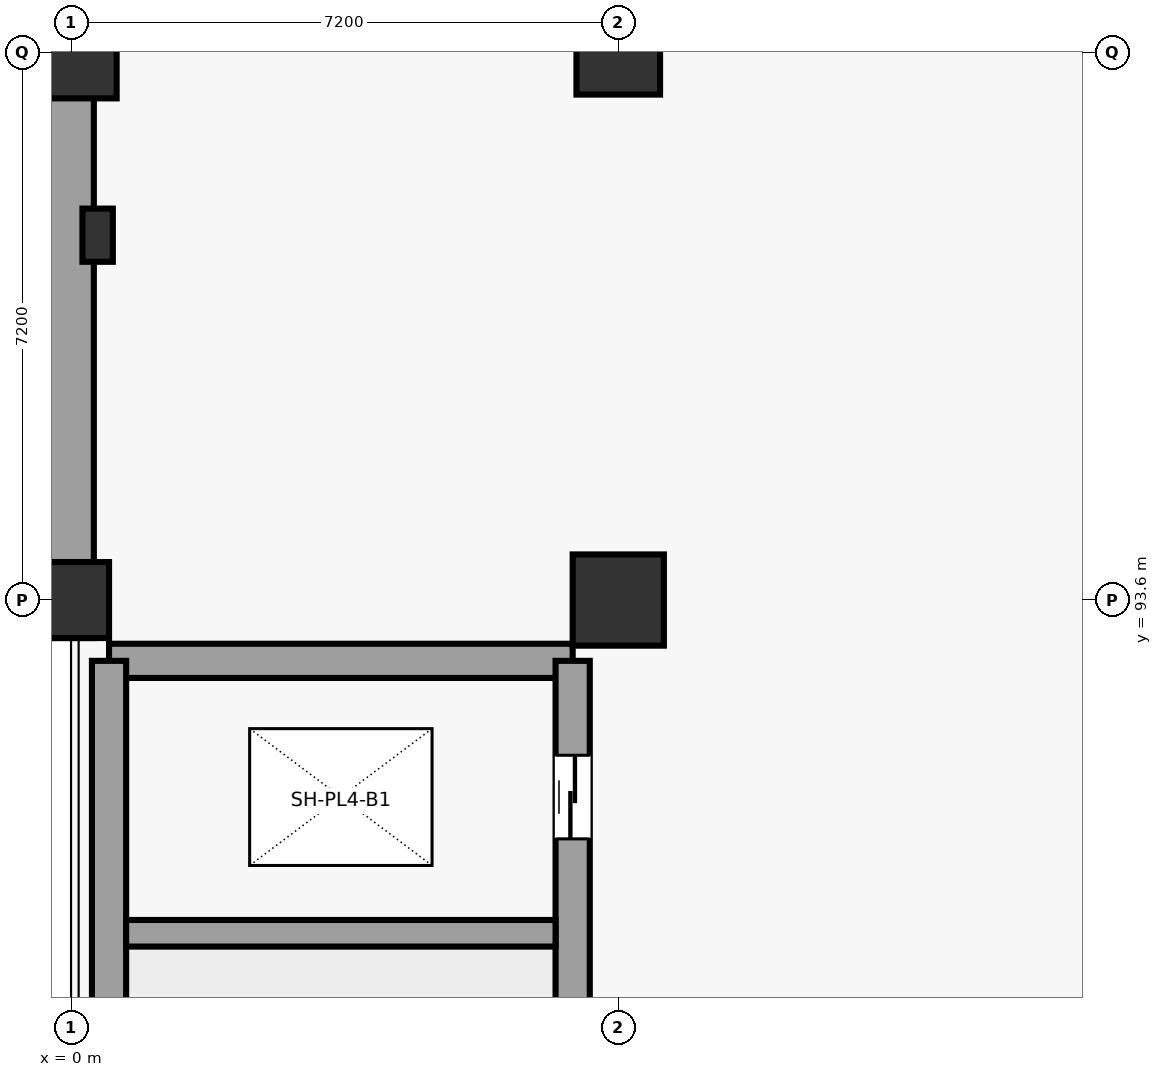
"""IFC4 building model, lengths in metres.
Left out: names, types, materials, properties, quantities, classifications, styles, units other than length and angle.
Written with IfcOpenShell. Run it as: python <this file> out.ifc"""

import sys

from ifc_helpers import new_model, si_unit, direction, frame, frame_2d, origin, origin_2d, place, context, subcontext, project, spatial, rectangle, circle, extrude, element, fill, save


model = new_model("IFC4")
c1 = context("Model", 3, precision=1e-05, world=origin(), true_north=direction((0.0, 1.0)))
c2 = subcontext(c1, "Body", "Model", "MODEL_VIEW")
j1 = project(units=[si_unit("LENGTHUNIT", "METRE"), si_unit("PLANEANGLEUNIT", "RADIAN")], contexts=[c1])
p1 = place(None, origin())
s1 = spatial("IfcSite", under=j1, at=p1, CompositionType="ELEMENT")
p2 = place(p1, origin())
s2 = spatial("IfcBuilding", under=s1, at=p2, CompositionType="ELEMENT")
p3 = place(p2, frame((0.0, 0.0, -5.4)))
s3 = spatial("IfcBuildingStorey", under=s2, at=p3, CompositionType="ELEMENT", Elevation=-5.4)
p4 = place(p3, frame((0.0, 93.6, 0.0), z_axis=(0.0, 0.0, 1.0), x_axis=(1.0, 0.0, 0.0)))
e1 = element("IfcColumn", 1, at=p4, inside=s3, PredefinedType="COLUMN", context=c2, shape_type="SweptSolid", body=[
    extrude(rectangle(XDim=1.0, YDim=1.0, at=origin_2d()), origin(), (0.0, 0.0, 1.0), 5.4),
])
for number, where, z_axis, x_axis in (
    (2, (0.0, 100.8, 0.0), (0.0, 0.0, 1.0), (1.0, 0.0, 0.0)),
    (3, (7.2, 93.6, 0.0), (0.0, 0.0, 1.0), (1.0, 0.0, 0.0)),
):
    element("IfcColumn", number, at=place(p3, frame(where, z_axis=z_axis, x_axis=x_axis)), inside=s3, PredefinedType="COLUMN", context=c2, shape_type="SweptSolid", body=[
        extrude(circle(Radius=0.6, at=origin_2d()), origin(), (0.0, 0.0, 1.0), 5.4),
    ])
p5 = place(p3, frame((7.2, 100.8, 0.0), z_axis=(0.0, 0.0, 1.0), x_axis=(1.0, 0.0, 0.0)))
e4 = element("IfcColumn", 4, at=p5, inside=s3, PredefinedType="COLUMN", context=c2, shape_type="SweptSolid", body=[
    extrude(rectangle(XDim=1.1, YDim=1.1, at=origin_2d()), origin(), (0.0, 0.0, 1.0), 5.4),
])
p6 = place(p3, frame((0.35, 98.4, 0.0), z_axis=(0.0, 0.0, 1.0), x_axis=(1.0, 0.0, 0.0)))
e5 = element("IfcColumn", 5, at=p6, inside=s3, PredefinedType="PILASTER", context=c2, shape_type="SweptSolid", body=[
    extrude(rectangle(XDim=0.4, YDim=0.7, at=origin_2d()), origin(), (0.0, 0.0, 1.0), 5.0),
])
p7 = place(p3, frame((0.0, 93.1, 0.0), z_axis=(0.0, 0.0, 1.0), x_axis=(0.0, 1.0, 0.0)))
e6 = element("IfcWall", 6, at=p7, inside=s3, PredefinedType="USERDEFINED", context=c2, shape_type="SweptSolid", body=[
    extrude(rectangle(XDim=36.5, YDim=0.6, at=frame_2d((18.25, 0.0))), origin(), (0.0, 0.0, 1.0), 4.98),
])
p8 = place(p3, frame((0.5, 92.8, 0.0), z_axis=(0.0, 0.0, 1.0), x_axis=(1.0, 0.0, 0.0)))
e7 = element("IfcWall", 7, at=p8, inside=s3, PredefinedType="SHEAR", context=c2, shape_type="SweptSolid", body=[
    extrude(rectangle(XDim=6.1, YDim=0.45, at=frame_2d((3.05, 0.0))), origin(), (0.0, 0.0, 1.0), 5.02),
])
p9 = place(p3, frame((0.5, 80.0, 0.0), z_axis=(0.0, 0.0, 1.0), x_axis=(0.0, 1.0, 0.0)))
e8 = element("IfcWall", 8, at=p9, inside=s3, PredefinedType="SHEAR", context=c2, shape_type="SweptSolid", body=[
    extrude(rectangle(XDim=12.8, YDim=0.45, at=frame_2d((6.4, 0.0))), origin(), (0.0, 0.0, 1.0), 5.02),
])
p10 = place(p3, frame((6.6, 80.0, 0.0), z_axis=(0.0, 0.0, 1.0), x_axis=(0.0, 1.0, 0.0)))
e9 = element("IfcWall", 9, at=p10, inside=s3, PredefinedType="SHEAR", context=c2, shape_type="SweptSolid", body=[
    extrude(rectangle(XDim=12.8, YDim=0.45, at=frame_2d((6.4, 0.0))), origin(), (0.0, 0.0, 1.0), 5.02),
])
p11 = place(p10, frame((0.55, 0.0, 0.0)))
e10 = element("IfcOpeningElement", 10, at=p11, cuts=e9, PredefinedType="OPENING", context=c2, shape_type="SweptSolid", body=[
    extrude(rectangle(XDim=1.2, YDim=2.25, at=frame_2d((0.6, 1.125))), frame((0.0, 0.235, 0.0), z_axis=(0.0, -1.0, 0.0), x_axis=(1.0, 0.0, 0.0)), (0.0, 0.0, 1.0), 0.47),
])
p12 = place(p10, frame((10.458, 0.0, 0.0)))
e11 = element("IfcOpeningElement", 11, at=p12, cuts=e9, PredefinedType="OPENING", context=c2, shape_type="SweptSolid", body=[
    extrude(rectangle(XDim=1.1, YDim=2.2, at=frame_2d((0.55, 1.1))), frame((0.0, 0.235, 0.0), z_axis=(0.0, -1.0, 0.0), x_axis=(1.0, 0.0, 0.0)), (0.0, 0.0, 1.0), 0.47),
])
p13 = place(p3, frame((0.725, 89.216, 0.0), z_axis=(0.0, 0.0, 1.0), x_axis=(1.0, 0.0, 0.0)))
e12 = element("IfcWall", 12, at=p13, inside=s3, PredefinedType="SHEAR", context=c2, shape_type="SweptSolid", body=[
    extrude(rectangle(XDim=5.65, YDim=0.35, at=frame_2d((2.825, 0.0))), origin(), (0.0, 0.0, 1.0), 5.02),
])
p14 = place(p12, origin())
e13 = element("IfcDoor", 13, at=p14, inside=s3, OperationType="SLIDING_TO_LEFT", PredefinedType="DOOR", context=c2, shape_type="SweptSolid", body=[
    extrude(rectangle(XDim=1.1, YDim=2.2, at=frame_2d((0.55, 1.1))), frame((0.0, 0.025, 0.0), z_axis=(0.0, -1.0, 0.0), x_axis=(1.0, 0.0, 0.0)), (0.0, 0.0, 1.0), 0.05),
])
fill(e11, e13)
save(model, sys.argv[1])
